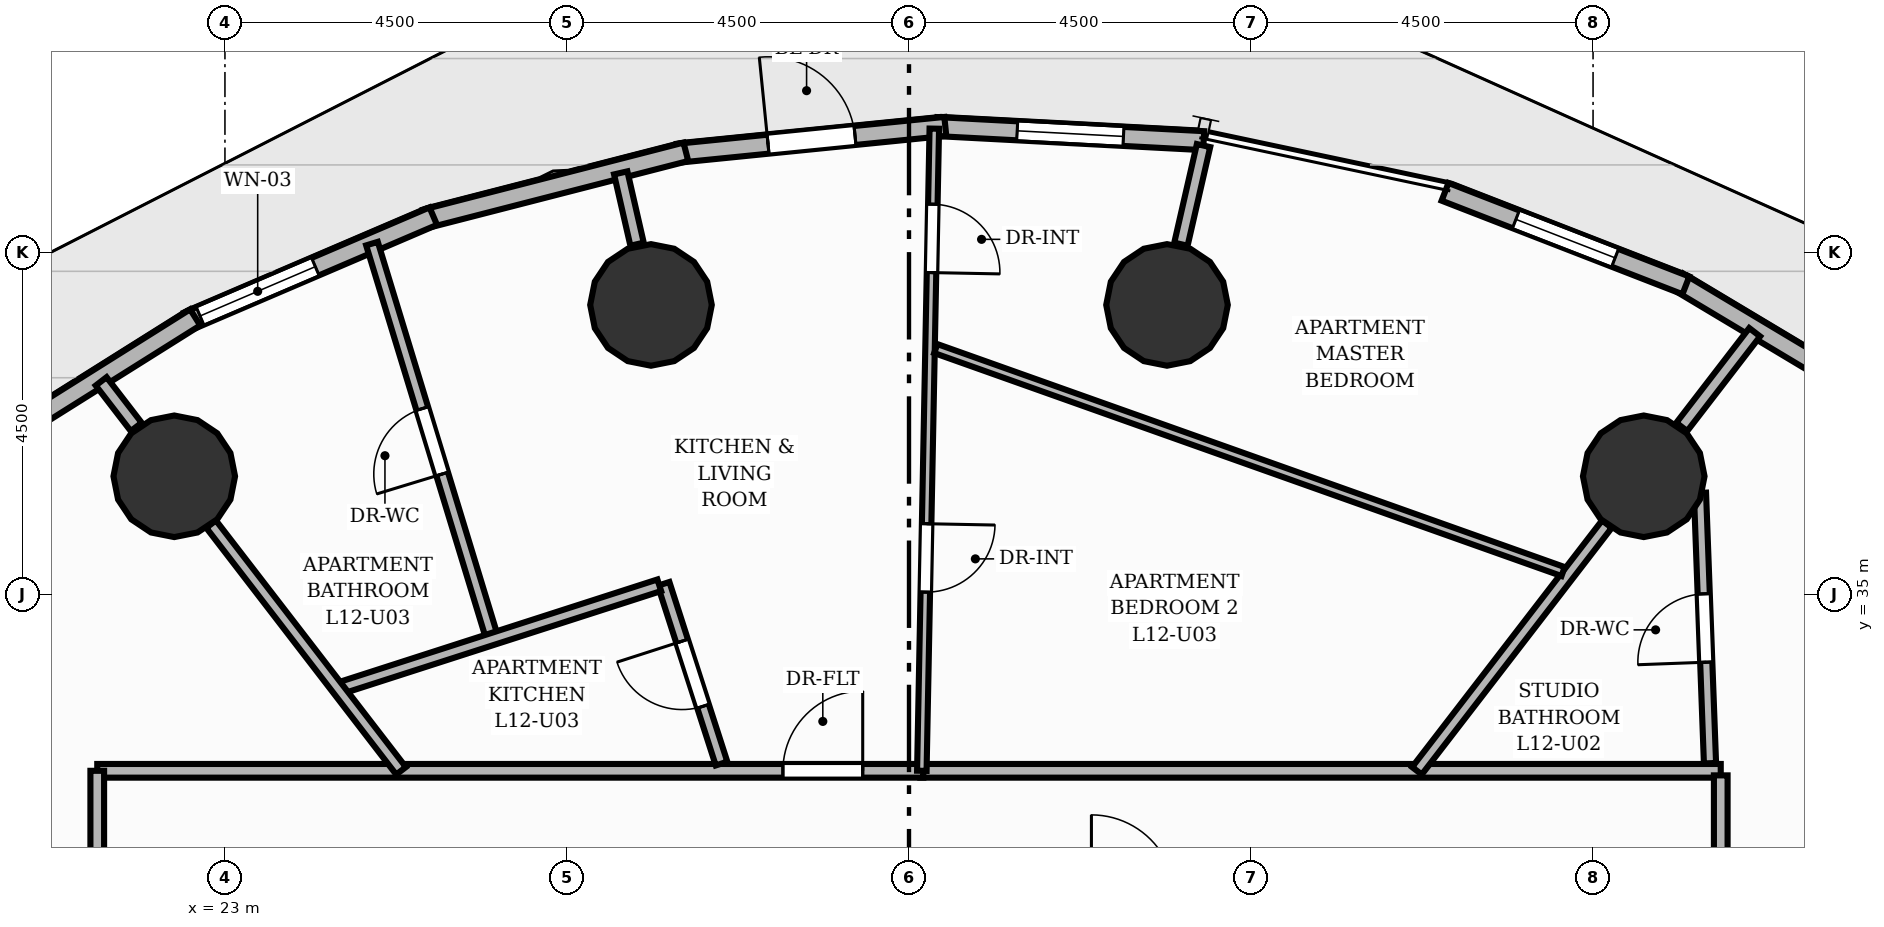
"""IFC4 building model, lengths in metres.
Left out: names, types, materials, properties, quantities, classifications, styles, units other than length and angle.
Written with IfcOpenShell. Run it as: python <this file> out.ifc"""

import sys

from ifc_helpers import new_model, si_unit, direction, frame, frame_2d, origin, origin_2d, place, context, subcontext, project, spatial, rectangle, circle, extrude, element, fill, save


model = new_model("IFC4")
c1 = context("Model", 3, precision=1e-05, world=origin(), true_north=direction((0.0, 1.0)))
c2 = subcontext(c1, "Body", "Model", "MODEL_VIEW")
j1 = project(units=[si_unit("LENGTHUNIT", "METRE"), si_unit("PLANEANGLEUNIT", "RADIAN")], contexts=[c1])
p1 = place(None, origin())
s1 = spatial("IfcSite", under=j1, at=p1, CompositionType="ELEMENT")
p2 = place(p1, origin())
s2 = spatial("IfcBuilding", under=s1, at=p2, CompositionType="ELEMENT")
p3 = place(p2, frame((0.0, 0.0, 44.0)))
s3 = spatial("IfcBuildingStorey", under=s2, at=p3, CompositionType="ELEMENT", Elevation=44.0)
for number, where, z_axis, x_axis in (
    (1, (41.667, 36.555, 0.0), (0.0, 0.0, 1.0), (1.0, 0.0, 0.0)),
    (2, (35.395, 38.81, 0.0), (0.0, 0.0, 1.0), (1.0, 0.0, 0.0)),
    (3, (28.605, 38.81, 0.0), (0.0, 0.0, 1.0), (1.0, 0.0, 0.0)),
    (4, (22.333, 36.555, 0.0), (0.0, 0.0, 1.0), (1.0, 0.0, 0.0)),
):
    element("IfcColumn", number, at=place(p3, frame(where, z_axis=z_axis, x_axis=x_axis)), inside=s3, PredefinedType="COLUMN", context=c2, shape_type="SweptSolid", body=[
        extrude(circle(Radius=0.8, at=origin_2d()), origin(), (0.0, 0.0, 1.0), 3.2),
    ])
p4 = place(p3, frame((42.122, 39.116, 0.0), z_axis=(0.0, 0.0, 1.0), x_axis=(0.858069400356, -0.513533742001, 0.0)))
e5 = element("IfcWall", 5, at=p4, inside=s3, PredefinedType="SOLIDWALL", context=c2, shape_type="SweptSolid", body=[
    extrude(rectangle(XDim=3.323, YDim=0.25, at=frame_2d((1.661, 0.0))), origin(), (0.0, 0.0, 1.0), 2.96),
])
p5 = place(p3, frame((39.053, 40.298, 0.0), z_axis=(0.0, 0.0, 1.0), x_axis=(0.932140755825, -0.362096135479, 0.0)))
e6 = element("IfcWall", 6, at=p5, inside=s3, PredefinedType="SOLIDWALL", context=c2, shape_type="SweptSolid", body=[
    extrude(rectangle(XDim=3.399, YDim=0.25, at=frame_2d((1.699, 0.0))), origin(), (0.0, 0.0, 1.0), 2.96),
])
p6 = place(p5, frame((1.0, 0.0, 0.85)))
e7 = element("IfcOpeningElement", 7, at=p6, cuts=e6, PredefinedType="OPENING", context=c2, shape_type="SweptSolid", body=[
    extrude(rectangle(XDim=1.4, YDim=1.55, at=frame_2d((0.7, 0.775))), frame((0.0, 0.135, 0.0), z_axis=(0.0, -1.0, 0.0), x_axis=(1.0, 0.0, 0.0)), (0.0, 0.0, 1.0), 0.27),
])
p7 = place(p3, frame((32.369, 41.156, 0.0), z_axis=(0.0, 0.0, 1.0), x_axis=(0.99860782827, -0.052748510102, 0.0)))
e8 = element("IfcWall", 8, at=p7, inside=s3, PredefinedType="SOLIDWALL", context=c2, shape_type="SweptSolid", body=[
    extrude(rectangle(XDim=3.513, YDim=0.25, at=frame_2d((1.756, 0.0))), origin(), (0.0, 0.0, 1.0), 2.96),
])
p8 = place(p7, frame((1.056, 0.0, 0.85)))
e9 = element("IfcOpeningElement", 9, at=p8, cuts=e8, PredefinedType="OPENING", context=c2, shape_type="SweptSolid", body=[
    extrude(rectangle(XDim=1.4, YDim=1.55, at=frame_2d((0.7, 0.775))), frame((0.0, 0.135, 0.0), z_axis=(0.0, -1.0, 0.0), x_axis=(1.0, 0.0, 0.0)), (0.0, 0.0, 1.0), 0.27),
])
p9 = place(p3, frame((28.957, 40.806, 0.0), z_axis=(0.0, 0.0, 1.0), x_axis=(0.994996115016, 0.099913618207, 0.0)))
e10 = element("IfcWall", 10, at=p9, inside=s3, PredefinedType="SOLIDWALL", context=c2, shape_type="SweptSolid", body=[
    extrude(rectangle(XDim=3.538, YDim=0.25, at=frame_2d((1.769, 0.0))), origin(), (0.0, 0.0, 1.0), 2.96),
])
p10 = place(p9, frame((1.194, 0.0, 0.0)))
e11 = element("IfcOpeningElement", 11, at=p10, cuts=e10, PredefinedType="OPENING", context=c2, shape_type="SweptSolid", body=[
    extrude(rectangle(XDim=1.15, YDim=2.2, at=frame_2d((0.575, 1.1))), frame((0.0, 0.135, 0.0), z_axis=(0.0, -1.0, 0.0), x_axis=(1.0, 0.0, 0.0)), (0.0, 0.0, 1.0), 0.27),
])
p11 = place(p3, frame((25.638, 39.943, 0.0), z_axis=(0.0, 0.0, 1.0), x_axis=(0.968459637573, 0.249170484594, 0.0)))
e12 = element("IfcWall", 12, at=p11, inside=s3, PredefinedType="SOLIDWALL", context=c2, shape_type="SweptSolid", body=[
    extrude(rectangle(XDim=3.538, YDim=0.25, at=frame_2d((1.769, 0.0))), origin(), (0.0, 0.0, 1.0), 2.96),
])
p12 = place(p3, frame((22.511, 38.595, 0.0), z_axis=(0.0, 0.0, 1.0), x_axis=(0.919263615987, 0.393642482872, 0.0)))
e13 = element("IfcWall", 13, at=p12, inside=s3, PredefinedType="SOLIDWALL", context=c2, shape_type="SweptSolid", body=[
    extrude(rectangle(XDim=3.513, YDim=0.25, at=frame_2d((1.756, 0.0))), origin(), (0.0, 0.0, 1.0), 2.96),
])
p13 = place(p12, frame((0.175, 0.0, 0.85)))
e14 = element("IfcOpeningElement", 14, at=p13, cuts=e13, PredefinedType="OPENING", context=c2, shape_type="SweptSolid", body=[
    extrude(rectangle(XDim=1.65, YDim=1.55, at=frame_2d((0.825, 0.775))), frame((0.0, 0.135, 0.0), z_axis=(0.0, -1.0, 0.0), x_axis=(1.0, 0.0, 0.0)), (0.0, 0.0, 1.0), 0.27),
])
p14 = place(p3, frame((19.674, 36.803, 0.0), z_axis=(0.0, 0.0, 1.0), x_axis=(0.846852351865, 0.531828068215, 0.0)))
e15 = element("IfcWall", 15, at=p14, inside=s3, PredefinedType="SOLIDWALL", context=c2, shape_type="SweptSolid", body=[
    extrude(rectangle(XDim=3.465, YDim=0.25, at=frame_2d((1.732, 0.0))), origin(), (0.0, 0.0, 1.0), 2.96),
])
p15 = place(p3, frame((42.167, 37.205, 0.0), z_axis=(0.0, 0.0, 1.0), x_axis=(0.609965884242, 0.792427674971, 0.0)))
e16 = element("IfcWall", 16, at=p15, inside=s3, PredefinedType="PARTITIONING", context=c2, shape_type="SweptSolid", body=[
    extrude(rectangle(XDim=1.572, YDim=0.18, at=frame_2d((0.786, 0.0))), origin(), (0.0, 0.0, 1.0), 2.178),
])
p16 = place(p3, frame((35.578, 39.609, 0.0), z_axis=(0.0, 0.0, 1.0), x_axis=(0.223372526283, 0.974733150407, 0.0)))
e17 = element("IfcWall", 17, at=p16, inside=s3, PredefinedType="PARTITIONING", context=c2, shape_type="SweptSolid", body=[
    extrude(rectangle(XDim=1.331, YDim=0.18, at=frame_2d((0.666, 0.0))), origin(), (0.0, 0.0, 1.0), 2.178),
])
p17 = place(p3, frame((28.422, 39.609, 0.0), z_axis=(0.0, 0.0, 1.0), x_axis=(-0.223210471103, 0.974770273239, 0.0)))
e18 = element("IfcWall", 18, at=p17, inside=s3, PredefinedType="PARTITIONING", context=c2, shape_type="SweptSolid", body=[
    extrude(rectangle(XDim=0.962, YDim=0.18, at=frame_2d((0.481, 0.0))), origin(), (0.0, 0.0, 1.0), 2.178),
])
p18 = place(p3, frame((21.833, 37.205, 0.0), z_axis=(0.0, 0.0, 1.0), x_axis=(-0.610022678174, 0.792383954982, 0.0)))
e19 = element("IfcWall", 19, at=p18, inside=s3, PredefinedType="PARTITIONING", context=c2, shape_type="SweptSolid", body=[
    extrude(rectangle(XDim=0.756, YDim=0.18, at=frame_2d((0.378, 0.0))), origin(), (0.0, 0.0, 1.0), 2.178),
])
p19 = place(p3, frame((32.149, 32.68, 0.0), z_axis=(0.0, 0.0, 1.0), x_axis=(1.0, 0.0, 0.0)))
e20 = element("IfcWall", 20, at=p19, inside=s3, PredefinedType="PARTITIONING", context=c2, shape_type="SweptSolid", body=[
    extrude(rectangle(XDim=10.531, YDim=0.18, at=frame_2d((5.266, 0.0))), origin(), (0.0, 0.0, 1.0), 2.955),
])
p20 = place(p3, frame((42.68, 32.62, 0.0), z_axis=(0.0, 0.0, 1.0), x_axis=(0.0, -1.0, 0.0)))
e21 = element("IfcWall", 21, at=p20, inside=s3, PredefinedType="PARTITIONING", context=c2, shape_type="SweptSolid", body=[
    extrude(rectangle(XDim=17.24, YDim=0.18, at=frame_2d((8.62, 0.0))), origin(), (0.0, 0.0, 1.0), 2.955),
])
p21 = place(p20, frame((8.095, 0.0, 0.0)))
e22 = element("IfcOpeningElement", 22, at=p21, cuts=e21, PredefinedType="OPENING", context=c2, shape_type="SweptSolid", body=[
    extrude(rectangle(XDim=1.05, YDim=2.15, at=frame_2d((0.525, 1.075))), frame((0.0, 0.1, 0.0), z_axis=(0.0, -1.0, 0.0), x_axis=(1.0, 0.0, 0.0)), (0.0, 0.0, 1.0), 0.2),
])
p22 = place(p3, frame((21.32, 32.68, 0.0), z_axis=(0.0, 0.0, 1.0), x_axis=(1.0, 0.0, 0.0)))
e23 = element("IfcWall", 23, at=p22, inside=s3, PredefinedType="PARTITIONING", context=c2, shape_type="SweptSolid", body=[
    extrude(rectangle(XDim=10.869, YDim=0.18, at=frame_2d((5.434, 0.0))), origin(), (0.0, 0.0, 1.0), 2.955),
])
p23 = place(p22, frame((9.021, 0.0, 0.0)))
e24 = element("IfcOpeningElement", 24, at=p23, cuts=e23, PredefinedType="OPENING", context=c2, shape_type="SweptSolid", body=[
    extrude(rectangle(XDim=1.05, YDim=2.15, at=frame_2d((0.525, 1.075))), frame((0.0, 0.1, 0.0), z_axis=(0.0, -1.0, 0.0), x_axis=(1.0, 0.0, 0.0)), (0.0, 0.0, 1.0), 0.2),
])
p24 = place(p3, frame((21.32, 15.38, 0.0), z_axis=(0.0, 0.0, 1.0), x_axis=(0.0, 1.0, 0.0)))
e25 = element("IfcWall", 25, at=p24, inside=s3, PredefinedType="PARTITIONING", context=c2, shape_type="SweptSolid", body=[
    extrude(rectangle(XDim=17.3, YDim=0.18, at=frame_2d((8.65, 0.0))), origin(), (0.0, 0.0, 1.0), 2.955),
])
p25 = place(p24, frame((8.125, 0.0, 0.0)))
e26 = element("IfcOpeningElement", 26, at=p25, cuts=e25, PredefinedType="OPENING", context=c2, shape_type="SweptSolid", body=[
    extrude(rectangle(XDim=1.05, YDim=2.15, at=frame_2d((0.525, 1.075))), frame((0.0, 0.1, 0.0), z_axis=(0.0, -1.0, 0.0), x_axis=(1.0, 0.0, 0.0)), (0.0, 0.0, 1.0), 0.2),
])
p26 = place(p3, frame((42.539, 32.78, 0.0), z_axis=(0.0, 0.0, 1.0), x_axis=(-0.037031951983, 0.999314082024, 0.0)))
e27 = element("IfcWall", 27, at=p26, inside=s3, PredefinedType="PLUMBINGWALL", context=c2, shape_type="SweptSolid", body=[
    extrude(rectangle(XDim=3.56, YDim=0.16, at=frame_2d((1.78, 0.0))), origin(), (0.0, 0.0, 1.0), 2.955),
])
p27 = place(p26, frame((1.33, 0.0, 0.0)))
e28 = element("IfcOpeningElement", 28, at=p27, cuts=e27, PredefinedType="OPENING", context=c2, shape_type="SweptSolid", body=[
    extrude(rectangle(XDim=0.9, YDim=2.1, at=frame_2d((0.45, 1.05))), frame((0.0, 0.09, 0.0), z_axis=(0.0, -1.0, 0.0), x_axis=(1.0, 0.0, 0.0)), (0.0, 0.0, 1.0), 0.18),
])
p28 = place(p3, frame((38.683, 32.68, 0.0), z_axis=(0.0, 0.0, 1.0), x_axis=(0.610116797158, 0.792311487879, 0.0)))
e29 = element("IfcWall", 29, at=p28, inside=s3, PredefinedType="PLUMBINGWALL", context=c2, shape_type="SweptSolid", body=[
    extrude(rectangle(XDim=4.096, YDim=0.16, at=frame_2d((2.048, 0.0))), origin(), (0.0, 0.0, 1.0), 2.178),
])
p29 = place(p3, frame((26.519, 34.414, 0.0), z_axis=(0.0, 0.0, 1.0), x_axis=(-0.291381320828, 0.956606986109, 0.0)))
e30 = element("IfcWall", 30, at=p29, inside=s3, PredefinedType="PLUMBINGWALL", context=c2, shape_type="SweptSolid", body=[
    extrude(rectangle(XDim=5.439, YDim=0.16, at=frame_2d((2.719, 0.0))), origin(), (0.0, 0.0, 1.0), 2.955),
])
p30 = place(p29, frame((2.269, 0.0, 0.0)))
e31 = element("IfcOpeningElement", 31, at=p30, cuts=e30, PredefinedType="OPENING", context=c2, shape_type="SweptSolid", body=[
    extrude(rectangle(XDim=0.9, YDim=2.1, at=frame_2d((0.45, 1.05))), frame((0.0, 0.09, 0.0), z_axis=(0.0, -1.0, 0.0), x_axis=(1.0, 0.0, 0.0)), (0.0, 0.0, 1.0), 0.18),
])
p31 = place(p3, frame((32.333, 41.129, 0.0), z_axis=(0.0, 0.0, 1.0), x_axis=(-0.019442133322, -0.999810983862, 0.0)))
e32 = element("IfcWall", 32, at=p31, inside=s3, PredefinedType="PARTITIONING", context=c2, shape_type="SweptSolid", body=[
    extrude(rectangle(XDim=8.451, YDim=0.125, at=frame_2d((4.226, 0.0))), origin(), (0.0, 0.0, 1.0), 2.955),
])
p32 = place(p31, frame((0.994, 0.0, 0.0)))
e33 = element("IfcOpeningElement", 33, at=p32, cuts=e32, PredefinedType="OPENING", context=c2, shape_type="SweptSolid", body=[
    extrude(rectangle(XDim=0.9, YDim=2.1, at=frame_2d((0.45, 1.05))), frame((0.0, 0.073, 0.0), z_axis=(0.0, -1.0, 0.0), x_axis=(1.0, 0.0, 0.0)), (0.0, 0.0, 1.0), 0.145),
])
p33 = place(p31, frame((5.199, 0.0, 0.0)))
e34 = element("IfcOpeningElement", 34, at=p33, cuts=e32, PredefinedType="OPENING", context=c2, shape_type="SweptSolid", body=[
    extrude(rectangle(XDim=0.9, YDim=2.1, at=frame_2d((0.45, 1.05))), frame((0.0, 0.073, 0.0), z_axis=(0.0, -1.0, 0.0), x_axis=(1.0, 0.0, 0.0)), (0.0, 0.0, 1.0), 0.145),
])
p34 = place(p3, frame((29.534, 32.775, 0.0), z_axis=(0.0, 0.0, 1.0), x_axis=(-0.306778830533, 0.95178083041, 0.0)))
e35 = element("IfcWall", 35, at=p34, inside=s3, PredefinedType="PLUMBINGWALL", context=c2, shape_type="SweptSolid", body=[
    extrude(rectangle(XDim=2.485, YDim=0.16, at=frame_2d((1.242, 0.0))), origin(), (0.0, 0.0, 1.0), 2.955),
])
p35 = place(p34, frame((0.792, 0.0, 0.0)))
e36 = element("IfcOpeningElement", 36, at=p35, cuts=e35, PredefinedType="OPENING", context=c2, shape_type="SweptSolid", body=[
    extrude(rectangle(XDim=0.9, YDim=2.1, at=frame_2d((0.45, 1.05))), frame((0.0, 0.09, 0.0), z_axis=(0.0, -1.0, 0.0), x_axis=(1.0, 0.0, 0.0)), (0.0, 0.0, 1.0), 0.18),
])
p36 = place(p3, frame((28.715, 35.122, 0.0), z_axis=(0.0, 0.0, 1.0), x_axis=(-0.951790418206, -0.306749082819, 0.0)))
e37 = element("IfcWall", 37, at=p36, inside=s3, PredefinedType="PLUMBINGWALL", context=c2, shape_type="SweptSolid", body=[
    extrude(rectangle(XDim=4.443, YDim=0.16, at=frame_2d((2.221, 0.0))), origin(), (0.0, 0.0, 1.0), 2.955),
])
p37 = place(p3, frame((25.317, 32.68, 0.0), z_axis=(0.0, 0.0, 1.0), x_axis=(-0.61008798772, 0.792333671656, 0.0)))
e38 = element("IfcWall", 38, at=p37, inside=s3, PredefinedType="PLUMBINGWALL", context=c2, shape_type="SweptSolid", body=[
    extrude(rectangle(XDim=4.097, YDim=0.16, at=frame_2d((2.048, 0.0))), origin(), (0.0, 0.0, 1.0), 2.178),
])
p38 = place(p3, frame((40.606, 35.302, 0.0), z_axis=(0.0, 0.0, 1.0), x_axis=(-0.942237172067, 0.334946430904, 0.0)))
e39 = element("IfcWall", 39, at=p38, inside=s3, PredefinedType="PARTITIONING", context=c2, shape_type="SweptSolid", body=[
    extrude(rectangle(XDim=8.759, YDim=0.125, at=frame_2d((4.379, 0.0))), origin(), (0.0, 0.0, 1.0), 2.955),
])
p39 = place(p10, origin())
e40 = element("IfcDoor", 40, at=p39, inside=s3, OperationType="SINGLE_SWING_LEFT", PredefinedType="DOOR", context=c2, shape_type="SweptSolid", body=[
    extrude(rectangle(XDim=1.15, YDim=2.2, at=frame_2d((0.575, 1.1))), frame((0.0, 0.025, 0.0), z_axis=(0.0, -1.0, 0.0), x_axis=(1.0, 0.0, 0.0)), (0.0, 0.0, 1.0), 0.05),
])
fill(e11, e40)
p40 = place(p6, origin())
e41 = element("IfcWindow", 41, at=p40, inside=s3, PartitioningType="SINGLE_PANEL", PredefinedType="WINDOW", context=c2, shape_type="SweptSolid", body=[
    extrude(rectangle(XDim=1.4, YDim=1.55, at=frame_2d((0.7, 0.775))), frame((0.0, 0.03, 0.0), z_axis=(0.0, -1.0, 0.0), x_axis=(1.0, 0.0, 0.0)), (0.0, 0.0, 1.0), 0.06),
])
fill(e7, e41)
p41 = place(p8, origin())
e42 = element("IfcWindow", 42, at=p41, inside=s3, PartitioningType="SINGLE_PANEL", PredefinedType="WINDOW", context=c2, shape_type="SweptSolid", body=[
    extrude(rectangle(XDim=1.4, YDim=1.55, at=frame_2d((0.7, 0.775))), frame((0.0, 0.03, 0.0), z_axis=(0.0, -1.0, 0.0), x_axis=(1.0, 0.0, 0.0)), (0.0, 0.0, 1.0), 0.06),
])
fill(e9, e42)
p42 = place(p13, origin())
e43 = element("IfcWindow", 43, at=p42, inside=s3, PartitioningType="SINGLE_PANEL", PredefinedType="WINDOW", context=c2, shape_type="SweptSolid", body=[
    extrude(rectangle(XDim=1.65, YDim=1.55, at=frame_2d((0.825, 0.775))), frame((0.0, 0.03, 0.0), z_axis=(0.0, -1.0, 0.0), x_axis=(1.0, 0.0, 0.0)), (0.0, 0.0, 1.0), 0.06),
])
fill(e14, e43)
p43 = place(p27, origin())
e44 = element("IfcDoor", 44, at=p43, inside=s3, OperationType="SINGLE_SWING_LEFT", PredefinedType="DOOR", context=c2, shape_type="SweptSolid", body=[
    extrude(rectangle(XDim=0.9, YDim=2.1, at=frame_2d((0.45, 1.05))), frame((0.0, 0.025, 0.0), z_axis=(0.0, -1.0, 0.0), x_axis=(1.0, 0.0, 0.0)), (0.0, 0.0, 1.0), 0.05),
])
fill(e28, e44)
p44 = place(p23, origin())
e45 = element("IfcDoor", 45, at=p44, inside=s3, OperationType="SINGLE_SWING_RIGHT", PredefinedType="DOOR", context=c2, shape_type="SweptSolid", body=[
    extrude(rectangle(XDim=1.05, YDim=2.15, at=frame_2d((0.525, 1.075))), frame((0.0, 0.025, 0.0), z_axis=(0.0, -1.0, 0.0), x_axis=(1.0, 0.0, 0.0)), (0.0, 0.0, 1.0), 0.05),
])
fill(e24, e45)
p45 = place(p30, origin())
e46 = element("IfcDoor", 46, at=p45, inside=s3, OperationType="SINGLE_SWING_LEFT", PredefinedType="DOOR", context=c2, shape_type="SweptSolid", body=[
    extrude(rectangle(XDim=0.9, YDim=2.1, at=frame_2d((0.45, 1.05))), frame((0.0, 0.025, 0.0), z_axis=(0.0, -1.0, 0.0), x_axis=(1.0, 0.0, 0.0)), (0.0, 0.0, 1.0), 0.05),
])
fill(e31, e46)
p46 = place(p32, origin())
e47 = element("IfcDoor", 47, at=p46, inside=s3, OperationType="SINGLE_SWING_RIGHT", PredefinedType="DOOR", context=c2, shape_type="SweptSolid", body=[
    extrude(rectangle(XDim=0.9, YDim=2.1, at=frame_2d((0.45, 1.05))), frame((0.0, 0.025, 0.0), z_axis=(0.0, -1.0, 0.0), x_axis=(1.0, 0.0, 0.0)), (0.0, 0.0, 1.0), 0.05),
])
fill(e33, e47)
p47 = place(p33, origin())
e48 = element("IfcDoor", 48, at=p47, inside=s3, OperationType="SINGLE_SWING_LEFT", PredefinedType="DOOR", context=c2, shape_type="SweptSolid", body=[
    extrude(rectangle(XDim=0.9, YDim=2.1, at=frame_2d((0.45, 1.05))), frame((0.0, 0.025, 0.0), z_axis=(0.0, -1.0, 0.0), x_axis=(1.0, 0.0, 0.0)), (0.0, 0.0, 1.0), 0.05),
])
fill(e34, e48)
p48 = place(p35, origin())
e49 = element("IfcDoor", 49, at=p48, inside=s3, OperationType="SINGLE_SWING_RIGHT", PredefinedType="DOOR", context=c2, shape_type="SweptSolid", body=[
    extrude(rectangle(XDim=0.9, YDim=2.1, at=frame_2d((0.45, 1.05))), frame((0.0, 0.025, 0.0), z_axis=(0.0, -1.0, 0.0), x_axis=(1.0, 0.0, 0.0)), (0.0, 0.0, 1.0), 0.05),
])
fill(e36, e49)
save(model, sys.argv[1])
